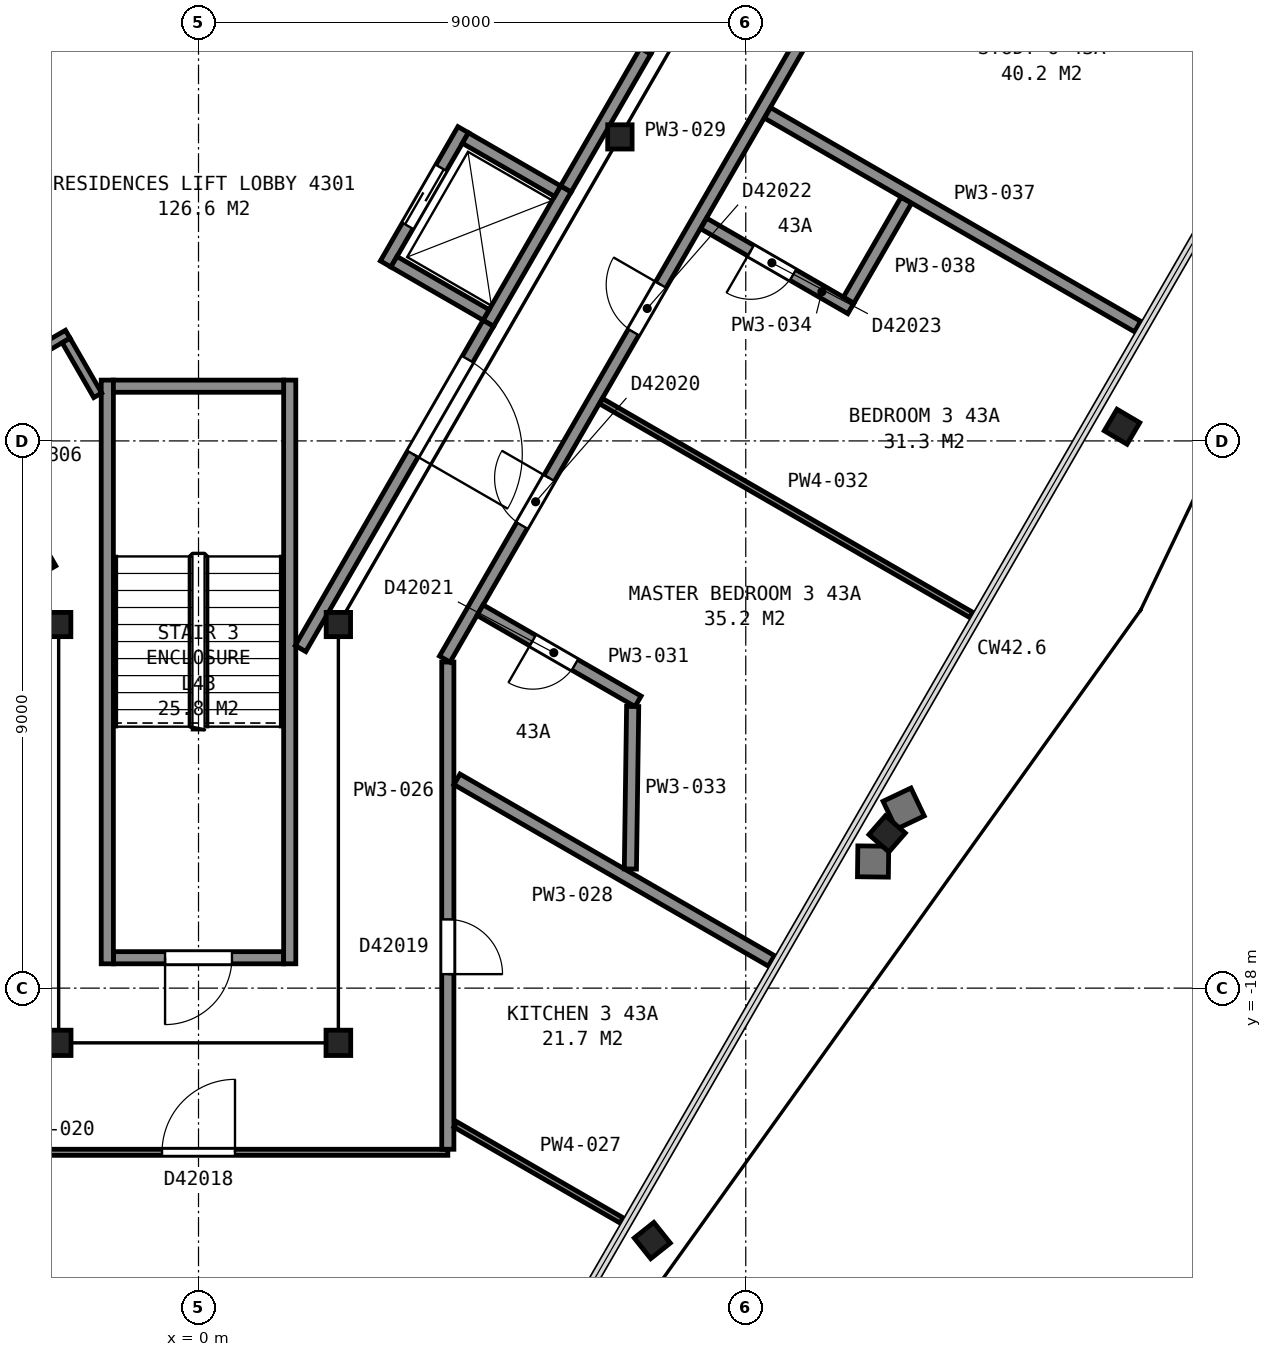
"""IFC4 building model, lengths in metres.
Left out: names, types, materials, properties, quantities, classifications, styles, units other than length and angle.
Written with IfcOpenShell. Run it as: python <this file> out.ifc"""

import sys

from ifc_helpers import new_model, si_unit, direction, frame, frame_2d, origin, origin_2d, place, context, subcontext, project, spatial, rectangle, i_section, extrude, element, fill, save


model = new_model("IFC4")
c1 = context("Model", 3, precision=1e-05, world=origin(), true_north=direction((0.0, 1.0)))
c2 = subcontext(c1, "Body", "Model", "MODEL_VIEW")
j1 = project(units=[si_unit("LENGTHUNIT", "METRE"), si_unit("PLANEANGLEUNIT", "RADIAN")], contexts=[c1])
p1 = place(None, origin())
s1 = spatial("IfcSite", under=j1, at=p1, CompositionType="ELEMENT")
p2 = place(p1, origin())
s2 = spatial("IfcBuilding", under=s1, at=p2, CompositionType="ELEMENT")
p3 = place(p2, frame((0.0, 0.0, 174.7)))
s3 = spatial("IfcBuildingStorey", under=s2, at=p3, CompositionType="ELEMENT", Elevation=174.7)
p4 = place(p3, frame((7.315, -21.966, 0.04), z_axis=(0.124429833743, -0.156280699311, 0.979843640331), x_axis=(-0.498834724262, -0.86349979086, -0.074377611249)))
e1 = element("IfcColumn", 1, at=p4, inside=s3, PredefinedType="COLUMN", context=c2, shape_type="SweptSolid", body=[
    extrude(i_section(OverallWidth=0.411, OverallDepth=0.434, WebThickness=0.036, FlangeThickness=0.057, FilletRadius=0.015, at=origin_2d()), origin(), (0.0, 0.0, 1.0), 3.695),
])
p5 = place(p3, frame((11.155, -15.314, 0.035), z_axis=(0.143292975225, -0.124737525438, 0.981787997991), x_axis=(-0.499725907096, -0.865392394927, -0.037013789052)))
e2 = element("IfcColumn", 2, at=p5, inside=s3, PredefinedType="COLUMN", context=c2, shape_type="SweptSolid", body=[
    extrude(i_section(OverallWidth=0.411, OverallDepth=0.434, WebThickness=0.036, FlangeThickness=0.057, FilletRadius=0.015, at=origin_2d()), origin(), (0.0, 0.0, 1.0), 3.697),
])
p6 = place(p3, frame((14.996, -8.653, 0.035), z_axis=(0.16191056894, -0.095587349349, 0.982164968989), x_axis=(-0.50013253787, -0.865946936972, -0.001829457054)))
e3 = element("IfcColumn", 3, at=p6, inside=s3, PredefinedType="COLUMN", context=c2, shape_type="SweptSolid", body=[
    extrude(i_section(OverallWidth=0.411, OverallDepth=0.434, WebThickness=0.036, FlangeThickness=0.057, FilletRadius=0.015, at=origin_2d()), origin(), (0.0, 0.0, 1.0), 3.696),
])
p7 = place(p3, frame((-2.3, -12.02, 0.0), z_axis=(0.0, 0.0, 1.0), x_axis=(1.0, 0.0, 0.0)))
e4 = element("IfcColumn", 4, at=p7, inside=s3, PredefinedType="COLUMN", context=c2, shape_type="SweptSolid", body=[
    extrude(i_section(OverallWidth=0.401, OverallDepth=0.399, WebThickness=0.025, FlangeThickness=0.04, FilletRadius=0.015, at=origin_2d()), origin(), (0.0, 0.0, 1.0), 3.7),
])
for number, where, z_axis, x_axis in (
    (5, (-2.3, -18.9, 0.0), (0.0, 0.0, 1.0), (-1.0, 0.0, 0.0)),
    (6, (2.3, -18.9, 0.0), (0.0, 0.0, 1.0), (-1.0, 0.0, 0.0)),
):
    element("IfcColumn", number, at=place(p3, frame(where, z_axis=z_axis, x_axis=x_axis)), inside=s3, PredefinedType="COLUMN", context=c2, shape_type="SweptSolid", body=[
        extrude(i_section(OverallWidth=0.406, OverallDepth=0.417, WebThickness=0.03, FlangeThickness=0.048, FilletRadius=0.015, at=origin_2d()), origin(), (0.0, 0.0, 1.0), 3.7),
    ])
for number, where, z_axis, x_axis in (
    (7, (2.3, -12.02, 0.0), (0.0, 0.0, 1.0), (1.0, 0.0, 0.0)),
    (8, (6.93, -4.0, 0.0), (0.0, 0.0, 1.0), (1.0, 0.0, 0.0)),
):
    element("IfcColumn", number, at=place(p3, frame(where, z_axis=z_axis, x_axis=x_axis)), inside=s3, PredefinedType="COLUMN", context=c2, shape_type="SweptSolid", body=[
        extrude(i_section(OverallWidth=0.401, OverallDepth=0.399, WebThickness=0.025, FlangeThickness=0.04, FilletRadius=0.015, at=origin_2d()), origin(), (0.0, 0.0, 1.0), 3.7),
    ])
p8 = place(p3, frame((-1.4, -17.5, 0.0), z_axis=(0.0, 0.0, 1.0), x_axis=(1.0, 0.0, 0.0)))
e9 = element("IfcWall", 9, at=p8, inside=s3, PredefinedType="PARTITIONING", context=c2, shape_type="SweptSolid", body=[
    extrude(rectangle(XDim=2.8, YDim=0.2, at=frame_2d((1.4, 0.0))), origin(), (0.0, 0.0, 1.0), 3.45),
])
p9 = place(p8, frame((0.85, 0.0, 0.0)))
e10 = element("IfcOpeningElement", 10, at=p9, cuts=e9, PredefinedType="OPENING", context=c2, shape_type="SweptSolid", body=[
    extrude(rectangle(XDim=1.1, YDim=2.1, at=frame_2d((0.55, 1.05))), frame((0.0, 0.11, 0.0), z_axis=(0.0, -1.0, 0.0), x_axis=(1.0, 0.0, 0.0)), (0.0, 0.0, 1.0), 0.22),
])
for number, where, z_axis, x_axis in (
    (11, (1.5, -8.0, 0.0), (0.0, 0.0, 1.0), (0.0, -1.0, 0.0)),
    (12, (-1.5, -8.0, 0.0), (0.0, 0.0, 1.0), (0.0, -1.0, 0.0)),
):
    element("IfcWall", number, at=place(p3, frame(where, z_axis=z_axis, x_axis=x_axis)), inside=s3, PredefinedType="PARTITIONING", context=c2, shape_type="SweptSolid", body=[
        extrude(rectangle(XDim=9.6, YDim=0.2, at=frame_2d((4.8, 0.0))), origin(), (0.0, 0.0, 1.0), 3.45),
    ])
p10 = place(p3, frame((-1.4, -8.1, 0.0), z_axis=(0.0, 0.0, 1.0), x_axis=(1.0, 0.0, 0.0)))
e13 = element("IfcWall", 13, at=p10, inside=s3, PredefinedType="PARTITIONING", context=c2, shape_type="SweptSolid", body=[
    extrude(rectangle(XDim=2.8, YDim=0.2, at=frame_2d((1.4, 0.0))), origin(), (0.0, 0.0, 1.0), 3.45),
])
p11 = place(p3, frame((4.766, -7.065, 0.0), z_axis=(0.0, 0.0, 1.0), x_axis=(0.499948979701, 0.866054858364, 0.0)))
e14 = element("IfcWall", 14, at=p11, inside=s3, PredefinedType="PARTITIONING", context=c2, shape_type="SweptSolid", body=[
    extrude(rectangle(XDim=2.55, YDim=0.2, at=frame_2d((1.275, 0.0))), origin(), (0.0, 0.0, 1.0), 3.7),
])
p12 = place(p3, frame((7.351, -2.587, 0.0), z_axis=(0.0, 0.0, 1.0), x_axis=(0.500002801628, 0.866023786258, 0.0)))
e15 = element("IfcWall", 15, at=p12, inside=s3, PredefinedType="PARTITIONING", context=c2, shape_type="SweptSolid", body=[
    extrude(rectangle(XDim=4.9, YDim=0.2, at=frame_2d((2.45, 0.0))), origin(), (0.0, 0.0, 1.0), 3.7),
])
p13 = place(p3, frame((3.077, -6.09, 0.0), z_axis=(0.0, 0.0, 1.0), x_axis=(0.500062241894, 0.865989465428, 0.0)))
e16 = element("IfcWall", 16, at=p13, inside=s3, PredefinedType="PARTITIONING", context=c2, shape_type="SweptSolid", body=[
    extrude(rectangle(XDim=2.55, YDim=0.2, at=frame_2d((1.275, 0.0))), origin(), (0.0, 0.0, 1.0), 3.7),
])
p14 = place(p13, frame((0.725, 0.0, 0.0)))
e17 = element("IfcOpeningElement", 17, at=p14, cuts=e16, PredefinedType="OPENING", context=c2, shape_type="SweptSolid", body=[
    extrude(rectangle(XDim=1.1, YDim=2.1, at=frame_2d((0.55, 1.05))), frame((0.0, 0.11, 0.0), z_axis=(0.0, -1.0, 0.0), x_axis=(1.0, 0.0, 0.0)), (0.0, 0.0, 1.0), 0.22),
])
p15 = place(p3, frame((5.905, -4.893, 0.0), z_axis=(0.0, 0.0, 1.0), x_axis=(-0.866002029911, 0.500040482552, 0.0)))
e18 = element("IfcWall", 18, at=p15, inside=s3, PredefinedType="PARTITIONING", context=c2, shape_type="SweptSolid", body=[
    extrude(rectangle(XDim=1.75, YDim=0.2, at=frame_2d((0.875, 0.0))), origin(), (0.0, 0.0, 1.0), 3.7),
])
p16 = place(p3, frame((4.73, -6.928, 0.0), z_axis=(0.0, 0.0, 1.0), x_axis=(-0.866036909293, 0.499980071345, 0.0)))
e19 = element("IfcWall", 19, at=p16, inside=s3, PredefinedType="PARTITIONING", context=c2, shape_type="SweptSolid", body=[
    extrude(rectangle(XDim=1.75, YDim=0.2, at=frame_2d((0.875, 0.0))), origin(), (0.0, 0.0, 1.0), 3.7),
])
p17 = place(p3, frame((-4.655, -7.257, 0.0), z_axis=(0.0, 0.0, 1.0), x_axis=(0.499892115999, -0.866087681682, 0.0)))
e20 = element("IfcWall", 20, at=p17, inside=s3, PredefinedType="PARTITIONING", context=c2, shape_type="SweptSolid", body=[
    extrude(rectangle(XDim=4.443, YDim=0.2, at=frame_2d((2.221, 0.0))), origin(), (0.0, 0.0, 1.0), 3.45),
])
p18 = place(p3, frame((-2.15, -7.246, 0.0), z_axis=(0.0, 0.0, 1.0), x_axis=(-0.866099396229, -0.499871819421, 0.0)))
e21 = element("IfcWall", 21, at=p18, inside=s3, PredefinedType="PARTITIONING", context=c2, shape_type="SweptSolid", body=[
    extrude(rectangle(XDim=2.075, YDim=0.15, at=frame_2d((1.038, 0.0))), origin(), (0.0, 0.0, 1.0), 3.45),
])
p19 = place(p18, frame((0.675, 0.0, 0.0)))
e22 = element("IfcOpeningElement", 22, at=p19, cuts=e21, PredefinedType="OPENING", context=c2, shape_type="SweptSolid", body=[
    extrude(rectangle(XDim=0.9, YDim=2.1, at=frame_2d((0.45, 1.05))), frame((0.0, 0.085, 0.0), z_axis=(0.0, -1.0, 0.0), x_axis=(1.0, 0.0, 0.0)), (0.0, 0.0, 1.0), 0.17),
])
p20 = place(p3, frame((-2.177, -7.348, 0.0), z_axis=(0.0, 0.0, 1.0), x_axis=(0.49972245349, -0.866185586049, 0.0)))
e23 = element("IfcWall", 23, at=p20, inside=s3, PredefinedType="PARTITIONING", context=c2, shape_type="SweptSolid", body=[
    extrude(rectangle(XDim=1.041, YDim=0.15, at=frame_2d((0.52, 0.0))), origin(), (0.0, 0.0, 1.0), 3.45),
])
p21 = place(p3, frame((1.677, -12.415, 0.0), z_axis=(0.0, 0.0, 1.0), x_axis=(0.500054337157, 0.865994029939, 0.0)))
e24 = element("IfcWall", 24, at=p21, inside=s3, PredefinedType="PARTITIONING", context=c2, shape_type="SweptSolid", body=[
    extrude(rectangle(XDim=6.177, YDim=0.2, at=frame_2d((3.088, 0.0))), origin(), (0.0, 0.0, 1.0), 3.45),
])
p22 = place(p21, frame((3.695, 0.0, 0.0)))
e25 = element("IfcOpeningElement", 25, at=p22, cuts=e24, PredefinedType="OPENING", context=c2, shape_type="SweptSolid", body=[
    extrude(rectangle(XDim=1.8, YDim=2.1, at=frame_2d((0.9, 1.05))), frame((0.0, 0.11, 0.0), z_axis=(0.0, -1.0, 0.0), x_axis=(1.0, 0.0, 0.0)), (0.0, 0.0, 1.0), 0.22),
])
p23 = place(p3, frame((6.042, -4.855, 0.0), z_axis=(0.0, 0.0, 1.0), x_axis=(0.500252727967, 0.865879442048, 0.0)))
e26 = element("IfcWall", 26, at=p23, inside=s3, PredefinedType="PARTITIONING", context=c2, shape_type="SweptSolid", body=[
    extrude(rectangle(XDim=2.617, YDim=0.2, at=frame_2d((1.309, 0.0))), origin(), (0.0, 0.0, 1.0), 3.45),
])
p24 = place(p3, frame((4.1, -20.7, 0.0), z_axis=(0.0, 0.0, 1.0), x_axis=(-1.0, 0.0, 0.0)))
e27 = element("IfcWall", 27, at=p24, inside=s3, PredefinedType="PARTITIONING", context=c2, shape_type="SweptSolid", body=[
    extrude(rectangle(XDim=8.25, YDim=0.1, at=frame_2d((4.125, 0.0))), origin(), (0.0, 0.0, 1.0), 2.713),
])
p25 = place(p24, frame((3.5, 0.0, 0.0)))
e28 = element("IfcOpeningElement", 28, at=p25, cuts=e27, PredefinedType="OPENING", context=c2, shape_type="SweptSolid", body=[
    extrude(rectangle(XDim=1.2, YDim=2.1, at=frame_2d((0.6, 1.05))), frame((0.0, 0.06, 0.0), z_axis=(0.0, -1.0, 0.0), x_axis=(1.0, 0.0, 0.0)), (0.0, 0.0, 1.0), 0.12),
])
p26 = place(p3, frame((4.1, -12.637, 0.0), z_axis=(0.0, 0.0, 1.0), x_axis=(0.0, -1.0, 0.0)))
e29 = element("IfcWall", 29, at=p26, inside=s3, PredefinedType="PARTITIONING", context=c2, shape_type="SweptSolid", body=[
    extrude(rectangle(XDim=8.013, YDim=0.2, at=frame_2d((4.006, 0.0))), origin(), (0.0, 0.0, 1.0), 2.713),
])
p27 = place(p26, frame((4.233, 0.0, 0.0)))
e30 = element("IfcOpeningElement", 30, at=p27, cuts=e29, PredefinedType="OPENING", context=c2, shape_type="SweptSolid", body=[
    extrude(rectangle(XDim=0.9, YDim=2.1, at=frame_2d((0.45, 1.05))), frame((0.0, 0.11, 0.0), z_axis=(0.0, -1.0, 0.0), x_axis=(1.0, 0.0, 0.0)), (0.0, 0.0, 1.0), 0.22),
])
p28 = place(p3, frame((4.225, -20.242, 0.0), z_axis=(0.0, 0.0, 1.0), x_axis=(0.866015493058, -0.500017165488, 0.0)))
e31 = element("IfcWall", 31, at=p28, inside=s3, PredefinedType="PARTITIONING", context=c2, shape_type="SweptSolid", body=[
    extrude(rectangle(XDim=3.155, YDim=0.1, at=frame_2d((1.578, 0.0))), origin(), (0.0, 0.0, 1.0), 2.713),
])
p29 = place(p3, frame((4.25, -14.566, 0.0), z_axis=(0.0, 0.0, 1.0), x_axis=(0.865990187664, -0.500060991149, 0.0)))
e32 = element("IfcWall", 32, at=p29, inside=s3, PredefinedType="PARTITIONING", context=c2, shape_type="SweptSolid", body=[
    extrude(rectangle(XDim=5.972, YDim=0.2, at=frame_2d((2.986, 0.0))), origin(), (0.0, 0.0, 1.0), 2.713),
])
p30 = place(p3, frame((12.916, 2.767, 0.0), z_axis=(0.0, 0.0, 1.0), x_axis=(-0.499999767326, -0.866025538119, 0.0)))
e33 = element("IfcWall", 33, at=p30, inside=s3, PredefinedType="PARTITIONING", context=c2, shape_type="SweptSolid", body=[
    extrude(rectangle(XDim=17.731, YDim=0.2, at=frame_2d((8.865, 0.0))), origin(), (0.0, 0.0, 1.0), 2.713),
])
p31 = place(p30, frame((14.293, 0.0, 0.0)))
e34 = element("IfcOpeningElement", 34, at=p31, cuts=e33, PredefinedType="OPENING", context=c2, shape_type="SweptSolid", body=[
    extrude(rectangle(XDim=0.9, YDim=2.1, at=frame_2d((0.45, 1.05))), frame((0.0, 0.11, 0.0), z_axis=(0.0, -1.0, 0.0), x_axis=(1.0, 0.0, 0.0)), (0.0, 0.0, 1.0), 0.22),
])
p32 = place(p30, frame((10.622, 0.0, 0.0)))
e35 = element("IfcOpeningElement", 35, at=p32, cuts=e33, PredefinedType="OPENING", context=c2, shape_type="SweptSolid", body=[
    extrude(rectangle(XDim=0.9, YDim=2.1, at=frame_2d((0.45, 1.05))), frame((0.0, 0.11, 0.0), z_axis=(0.0, -1.0, 0.0), x_axis=(1.0, 0.0, 0.0)), (0.0, 0.0, 1.0), 0.22),
])
p33 = place(p30, frame((3.897, 0.0, 0.0)))
e36 = element("IfcOpeningElement", 36, at=p33, cuts=e33, PredefinedType="OPENING", context=c2, shape_type="SweptSolid", body=[
    extrude(rectangle(XDim=0.9, YDim=2.1, at=frame_2d((0.45, 1.05))), frame((0.0, 0.11, 0.0), z_axis=(0.0, -1.0, 0.0), x_axis=(1.0, 0.0, 0.0)), (0.0, 0.0, 1.0), 0.22),
])
p34 = place(p30, frame((0.283, 0.0, 0.0)))
e37 = element("IfcOpeningElement", 37, at=p34, cuts=e33, PredefinedType="OPENING", context=c2, shape_type="SweptSolid", body=[
    extrude(rectangle(XDim=0.9, YDim=2.1, at=frame_2d((0.45, 1.05))), frame((0.0, 0.11, 0.0), z_axis=(0.0, -1.0, 0.0), x_axis=(1.0, 0.0, 0.0)), (0.0, 0.0, 1.0), 0.22),
])
p35 = place(p3, frame((7.229, -13.283, 0.0), z_axis=(0.0, 0.0, 1.0), x_axis=(-0.866010750942, 0.50002537861, 0.0)))
e38 = element("IfcWall", 38, at=p35, inside=s3, PredefinedType="PARTITIONING", context=c2, shape_type="SweptSolid", body=[
    extrude(rectangle(XDim=3.0, YDim=0.2, at=frame_2d((1.5, 0.0))), origin(), (0.0, 0.0, 1.0), 2.713),
])
p36 = place(p35, frame((1.2, 0.0, 0.0)))
e39 = element("IfcOpeningElement", 39, at=p36, cuts=e38, PredefinedType="OPENING", context=c2, shape_type="SweptSolid", body=[
    extrude(rectangle(XDim=0.8, YDim=2.1, at=frame_2d((0.4, 1.05))), frame((0.0, 0.11, 0.0), z_axis=(0.0, -1.0, 0.0), x_axis=(1.0, 0.0, 0.0)), (0.0, 0.0, 1.0), 0.22),
])
p37 = place(p3, frame((6.62, -8.346, 0.0), z_axis=(0.0, 0.0, 1.0), x_axis=(0.866005124189, -0.500035123644, 0.0)))
e40 = element("IfcWall", 40, at=p37, inside=s3, PredefinedType="PARTITIONING", context=c2, shape_type="SweptSolid", body=[
    extrude(rectangle(XDim=7.029, YDim=0.1, at=frame_2d((3.515, 0.0))), origin(), (0.0, 0.0, 1.0), 2.713),
])
p38 = place(p3, frame((7.102, -16.041, 0.0), z_axis=(0.0, 0.0, 1.0), x_axis=(0.014157711251, 0.999899774584, 0.0)))
e41 = element("IfcWall", 41, at=p38, inside=s3, PredefinedType="PARTITIONING", context=c2, shape_type="SweptSolid", body=[
    extrude(rectangle(XDim=2.673, YDim=0.2, at=frame_2d((1.336, 0.0))), origin(), (0.0, 0.0, 1.0), 2.713),
])
p39 = place(p3, frame((8.308, -5.424, 0.0), z_axis=(0.0, 0.0, 1.0), x_axis=(0.866041588165, -0.499971966783, 0.0)))
e42 = element("IfcWall", 42, at=p39, inside=s3, PredefinedType="PARTITIONING", context=c2, shape_type="SweptSolid", body=[
    extrude(rectangle(XDim=2.795, YDim=0.2, at=frame_2d((1.397, 0.0))), origin(), (0.0, 0.0, 1.0), 2.713),
])
p40 = place(p39, frame((0.895, 0.0, 0.0)))
e43 = element("IfcOpeningElement", 43, at=p40, cuts=e42, PredefinedType="OPENING", context=c2, shape_type="SweptSolid", body=[
    extrude(rectangle(XDim=0.8, YDim=2.1, at=frame_2d((0.4, 1.05))), frame((0.0, 0.11, 0.0), z_axis=(0.0, -1.0, 0.0), x_axis=(1.0, 0.0, 0.0)), (0.0, 0.0, 1.0), 0.22),
])
p41 = place(p3, frame((9.358, -3.604, 0.0), z_axis=(0.0, 0.0, 1.0), x_axis=(0.866011480283, -0.500024115436, 0.0)))
e44 = element("IfcWall", 44, at=p41, inside=s3, PredefinedType="PARTITIONING", context=c2, shape_type="SweptSolid", body=[
    extrude(rectangle(XDim=7.029, YDim=0.2, at=frame_2d((3.515, 0.0))), origin(), (0.0, 0.0, 1.0), 2.713),
])
p42 = place(p3, frame((10.692, -6.684, 0.0), z_axis=(0.0, 0.0, 1.0), x_axis=(0.499949193323, 0.866054735046, 0.0)))
e45 = element("IfcWall", 45, at=p42, inside=s3, PredefinedType="PARTITIONING", context=c2, shape_type="SweptSolid", body=[
    extrude(rectangle(XDim=1.895, YDim=0.2, at=frame_2d((0.948, 0.0))), origin(), (0.0, 0.0, 1.0), 2.713),
])
p43 = place(p9, origin())
e46 = element("IfcDoor", 46, at=p43, inside=s3, OperationType="SINGLE_SWING_LEFT", PredefinedType="DOOR", context=c2, shape_type="SweptSolid", body=[
    extrude(rectangle(XDim=1.1, YDim=2.1, at=frame_2d((0.55, 1.05))), frame((0.0, 0.025, 0.0), z_axis=(0.0, -1.0, 0.0), x_axis=(1.0, 0.0, 0.0)), (0.0, 0.0, 1.0), 0.05),
])
fill(e10, e46)
p44 = place(p14, origin())
e47 = element("IfcDoor", 47, at=p44, inside=s3, OperationType="SLIDING_TO_LEFT", PredefinedType="DOOR", context=c2, shape_type="SweptSolid", body=[
    extrude(rectangle(XDim=1.1, YDim=2.1, at=frame_2d((0.55, 1.05))), frame((0.0, 0.025, 0.0), z_axis=(0.0, -1.0, 0.0), x_axis=(1.0, 0.0, 0.0)), (0.0, 0.0, 1.0), 0.05),
])
fill(e17, e47)
p45 = place(p22, origin())
e48 = element("IfcDoor", 48, at=p45, inside=s3, OperationType="DOUBLE_DOOR_SINGLE_SWING", PredefinedType="DOOR", context=c2, shape_type="SweptSolid", body=[
    extrude(rectangle(XDim=1.8, YDim=2.1, at=frame_2d((0.9, 1.05))), frame((0.0, 0.025, 0.0), z_axis=(0.0, -1.0, 0.0), x_axis=(1.0, 0.0, 0.0)), (0.0, 0.0, 1.0), 0.05),
])
fill(e25, e48)
p46 = place(p25, origin())
e49 = element("IfcDoor", 49, at=p46, inside=s3, OperationType="SINGLE_SWING_LEFT", PredefinedType="DOOR", context=c2, shape_type="SweptSolid", body=[
    extrude(rectangle(XDim=1.2, YDim=2.1, at=frame_2d((0.6, 1.05))), frame((0.0, 0.025, 0.0), z_axis=(0.0, -1.0, 0.0), x_axis=(1.0, 0.0, 0.0)), (0.0, 0.0, 1.0), 0.05),
])
fill(e28, e49)
p47 = place(p27, origin())
e50 = element("IfcDoor", 50, at=p47, inside=s3, OperationType="SINGLE_SWING_RIGHT", PredefinedType="DOOR", context=c2, shape_type="SweptSolid", body=[
    extrude(rectangle(XDim=0.9, YDim=2.1, at=frame_2d((0.45, 1.05))), frame((0.0, 0.025, 0.0), z_axis=(0.0, -1.0, 0.0), x_axis=(1.0, 0.0, 0.0)), (0.0, 0.0, 1.0), 0.05),
])
fill(e30, e50)
p48 = place(p31, origin())
e51 = element("IfcDoor", 51, at=p48, inside=s3, OperationType="SINGLE_SWING_LEFT", PredefinedType="DOOR", context=c2, shape_type="SweptSolid", body=[
    extrude(rectangle(XDim=0.9, YDim=2.1, at=frame_2d((0.45, 1.05))), frame((0.0, 0.025, 0.0), z_axis=(0.0, -1.0, 0.0), x_axis=(1.0, 0.0, 0.0)), (0.0, 0.0, 1.0), 0.05),
])
fill(e34, e51)
p49 = place(p32, origin())
e52 = element("IfcDoor", 52, at=p49, inside=s3, OperationType="SINGLE_SWING_LEFT", PredefinedType="DOOR", context=c2, shape_type="SweptSolid", body=[
    extrude(rectangle(XDim=0.9, YDim=2.1, at=frame_2d((0.45, 1.05))), frame((0.0, 0.025, 0.0), z_axis=(0.0, -1.0, 0.0), x_axis=(1.0, 0.0, 0.0)), (0.0, 0.0, 1.0), 0.05),
])
fill(e35, e52)
p50 = place(p36, origin())
e53 = element("IfcDoor", 53, at=p50, inside=s3, OperationType="SINGLE_SWING_RIGHT", PredefinedType="DOOR", context=c2, shape_type="SweptSolid", body=[
    extrude(rectangle(XDim=0.8, YDim=2.1, at=frame_2d((0.4, 1.05))), frame((0.0, 0.025, 0.0), z_axis=(0.0, -1.0, 0.0), x_axis=(1.0, 0.0, 0.0)), (0.0, 0.0, 1.0), 0.05),
])
fill(e39, e53)
p51 = place(p40, origin())
e54 = element("IfcDoor", 54, at=p51, inside=s3, OperationType="SINGLE_SWING_LEFT", PredefinedType="DOOR", context=c2, shape_type="SweptSolid", body=[
    extrude(rectangle(XDim=0.8, YDim=2.1, at=frame_2d((0.4, 1.05))), frame((0.0, 0.025, 0.0), z_axis=(0.0, -1.0, 0.0), x_axis=(1.0, 0.0, 0.0)), (0.0, 0.0, 1.0), 0.05),
])
fill(e43, e54)
save(model, sys.argv[1])
